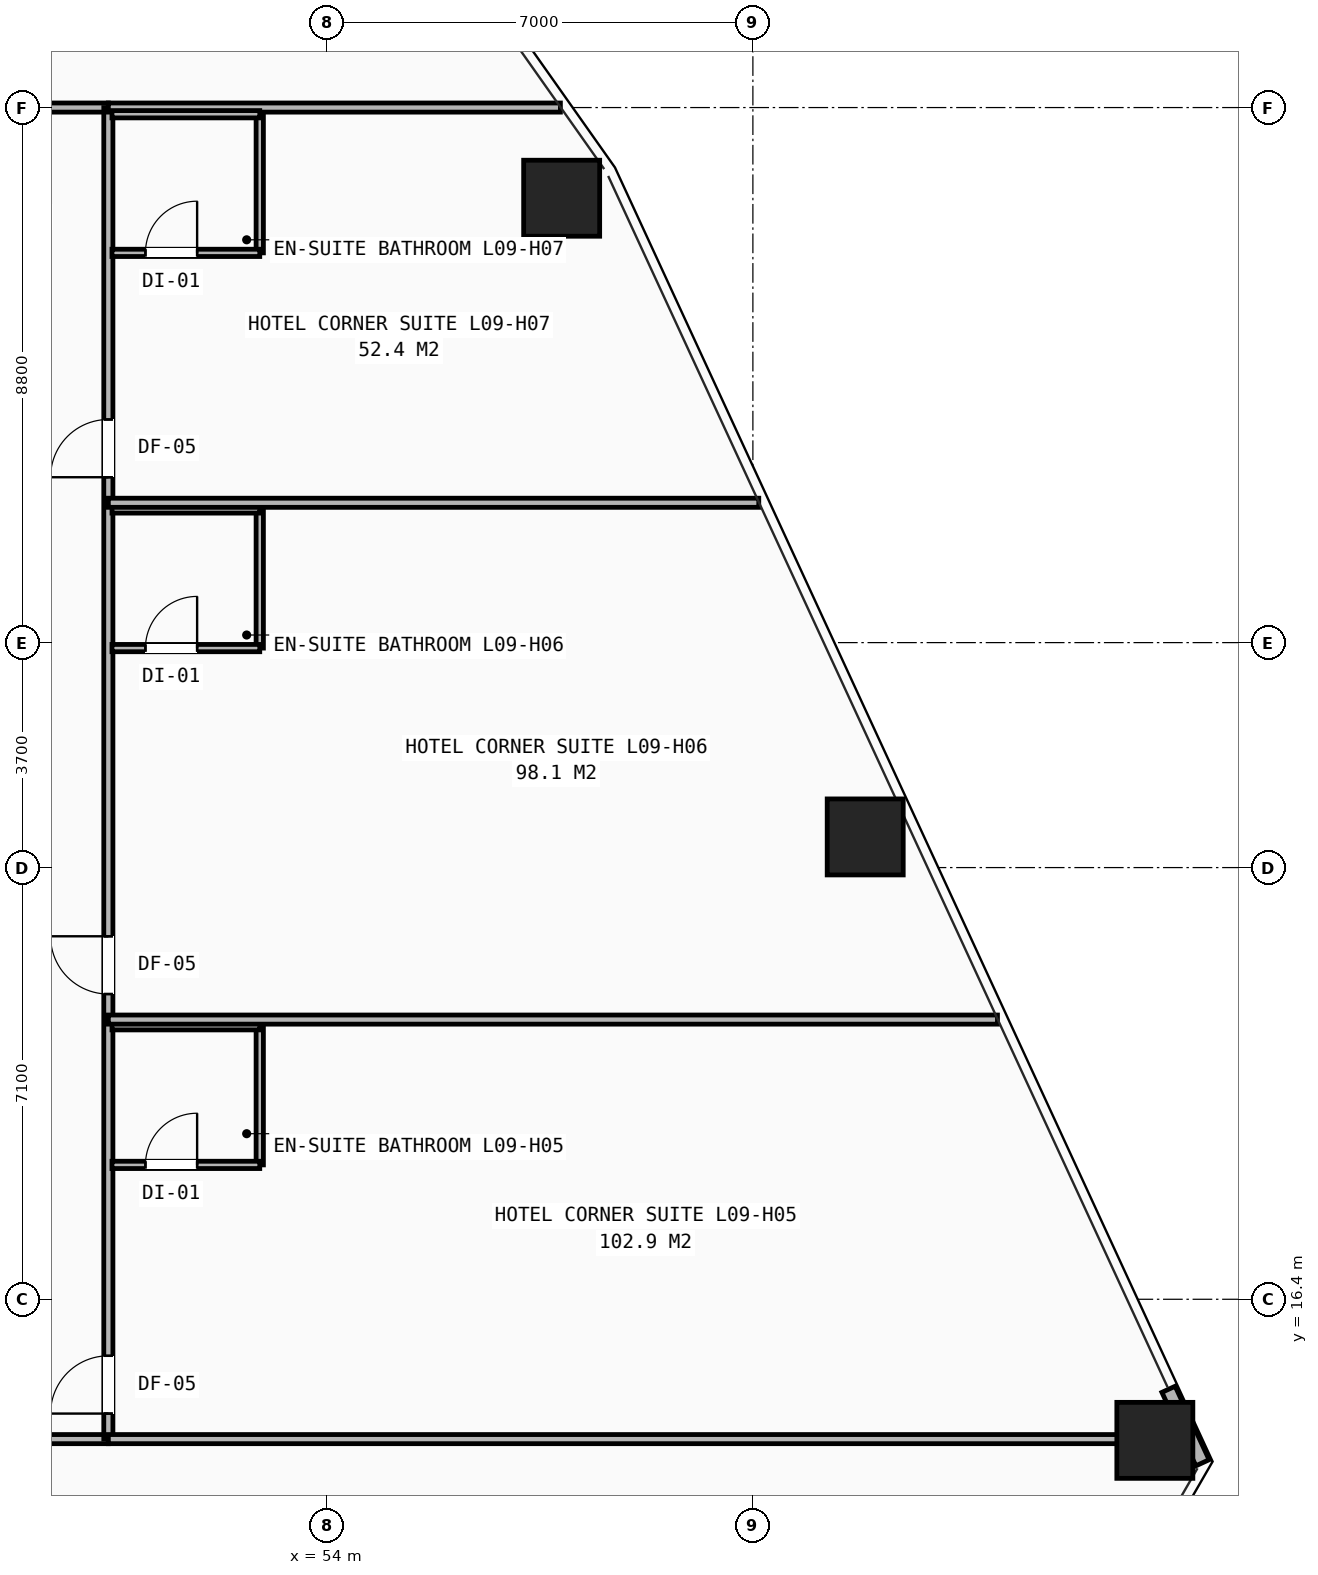
"""IFC4 building model, lengths in metres.
Left out: names, types, materials, properties, quantities, classifications, styles, units other than length and angle.
Written with IfcOpenShell. Run it as: python <this file> out.ifc"""

import sys

from ifc_helpers import new_model, si_unit, direction, frame, frame_2d, origin, origin_2d, place, context, subcontext, project, spatial, rectangle, hollow_rectangle, extrude, element, fill, save


model = new_model("IFC4")
c1 = context("Model", 3, precision=1e-05, world=origin(), true_north=direction((0.0, 1.0)))
c2 = subcontext(c1, "Body", "Model", "MODEL_VIEW")
j1 = project(units=[si_unit("LENGTHUNIT", "METRE"), si_unit("PLANEANGLEUNIT", "RADIAN")], contexts=[c1])
p1 = place(None, origin())
s1 = spatial("IfcSite", under=j1, at=p1, CompositionType="ELEMENT")
p2 = place(p1, origin())
s2 = spatial("IfcBuilding", under=s1, at=p2, CompositionType="ELEMENT")
p3 = place(p2, frame((0.0, 0.0, 36.8)))
s3 = spatial("IfcBuildingStorey", under=s2, at=p3, CompositionType="ELEMENT", Elevation=36.8)
for number, where, z_axis, x_axis in (
    (1, (67.611, 14.08, 0.0), (0.0, 0.0, 1.0), (1.0, 0.0, 0.0)),
    (2, (62.847, 24.004, 0.0), (0.0, 0.0, 1.0), (1.0, 0.0, 0.0)),
    (3, (57.855, 34.509, 0.0), (0.0, 0.0, 1.0), (1.0, 0.0, 0.0)),
):
    element("IfcColumn", number, at=place(p3, frame(where, z_axis=z_axis, x_axis=x_axis)), inside=s3, PredefinedType="COLUMN", context=c2, shape_type="SweptSolid", body=[
        extrude(hollow_rectangle(XDim=1.25, YDim=1.25, WallThickness=0.08, at=origin_2d()), origin(), (0.0, 0.0, 1.0), 3.2),
    ])
p4 = place(p3, frame((68.394, 13.711, 0.0), z_axis=(0.0, 0.0, 1.0), x_axis=(-0.419348851808, 0.907825170662, 0.0)))
e4 = element("IfcWall", 4, at=p4, inside=s3, PredefinedType="SHEAR", context=c2, shape_type="SweptSolid", body=[
    extrude(rectangle(XDim=1.332, YDim=0.24, at=frame_2d((0.666, 0.0))), origin(), (0.0, 0.0, 1.0), 2.263),
])
p5 = place(p3, frame((29.6, 14.1, 0.0), z_axis=(0.0, 0.0, 1.0), x_axis=(1.0, 0.0, 0.0)))
e5 = element("IfcWall", 5, at=p5, inside=s3, PredefinedType="PARTITIONING", context=c2, shape_type="SweptSolid", body=[
    extrude(rectangle(XDim=20.8, YDim=0.15, at=frame_2d((10.4, 0.0))), origin(), (0.0, 0.0, 1.0), 2.431),
])
p6 = place(p5, frame((0.57, 0.0, 0.0)))
e6 = element("IfcOpeningElement", 6, at=p6, cuts=e5, PredefinedType="OPENING", context=c2, shape_type="SweptSolid", body=[
    extrude(rectangle(XDim=0.95, YDim=2.1, at=frame_2d((0.475, 1.05))), frame((0.0, 0.085, 0.0), z_axis=(0.0, -1.0, 0.0), x_axis=(1.0, 0.0, 0.0)), (0.0, 0.0, 1.0), 0.17),
])
p7 = place(p5, frame((10.32, 0.0, 0.0)))
e7 = element("IfcOpeningElement", 7, at=p7, cuts=e5, PredefinedType="OPENING", context=c2, shape_type="SweptSolid", body=[
    extrude(rectangle(XDim=0.95, YDim=2.1, at=frame_2d((0.475, 1.05))), frame((0.0, 0.085, 0.0), z_axis=(0.0, -1.0, 0.0), x_axis=(1.0, 0.0, 0.0)), (0.0, 0.0, 1.0), 0.17),
])
p8 = place(p3, frame((40.75, 36.0, 0.0), z_axis=(0.0, 0.0, 1.0), x_axis=(1.0, 0.0, 0.0)))
e8 = element("IfcWall", 8, at=p8, inside=s3, PredefinedType="PARTITIONING", context=c2, shape_type="SweptSolid", body=[
    extrude(rectangle(XDim=9.65, YDim=0.15, at=frame_2d((4.825, 0.0))), origin(), (0.0, 0.0, 1.0), 2.513),
])
p9 = place(p8, frame((0.2, 0.0, 0.0)))
e9 = element("IfcOpeningElement", 9, at=p9, cuts=e8, PredefinedType="OPENING", context=c2, shape_type="SweptSolid", body=[
    extrude(rectangle(XDim=0.95, YDim=2.1, at=frame_2d((0.475, 1.05))), frame((0.0, 0.085, 0.0), z_axis=(0.0, -1.0, 0.0), x_axis=(1.0, 0.0, 0.0)), (0.0, 0.0, 1.0), 0.17),
])
p10 = place(p3, frame((50.4, 14.1, 0.0), z_axis=(0.0, 0.0, 1.0), x_axis=(0.0, 1.0, 0.0)))
e10 = element("IfcWall", 10, at=p10, inside=s3, PredefinedType="PARTITIONING", context=c2, shape_type="SweptSolid", body=[
    extrude(rectangle(XDim=21.9, YDim=0.15, at=frame_2d((10.95, 0.0))), origin(), (0.0, 0.0, 1.0), 2.431),
])
p11 = place(p10, frame((0.42, 0.0, 0.0)))
e11 = element("IfcOpeningElement", 11, at=p11, cuts=e10, PredefinedType="OPENING", context=c2, shape_type="SweptSolid", body=[
    extrude(rectangle(XDim=0.95, YDim=2.1, at=frame_2d((0.475, 1.05))), frame((0.0, 0.085, 0.0), z_axis=(0.0, -1.0, 0.0), x_axis=(1.0, 0.0, 0.0)), (0.0, 0.0, 1.0), 0.17),
])
p12 = place(p10, frame((7.32, 0.0, 0.0)))
e12 = element("IfcOpeningElement", 12, at=p12, cuts=e10, PredefinedType="OPENING", context=c2, shape_type="SweptSolid", body=[
    extrude(rectangle(XDim=0.95, YDim=2.1, at=frame_2d((0.475, 1.05))), frame((0.0, 0.085, 0.0), z_axis=(0.0, -1.0, 0.0), x_axis=(1.0, 0.0, 0.0)), (0.0, 0.0, 1.0), 0.17),
])
p13 = place(p10, frame((15.82, 0.0, 0.0)))
e13 = element("IfcOpeningElement", 13, at=p13, cuts=e10, PredefinedType="OPENING", context=c2, shape_type="SweptSolid", body=[
    extrude(rectangle(XDim=0.95, YDim=2.1, at=frame_2d((0.475, 1.05))), frame((0.0, 0.085, 0.0), z_axis=(0.0, -1.0, 0.0), x_axis=(1.0, 0.0, 0.0)), (0.0, 0.0, 1.0), 0.17),
])
p14 = place(p3, frame((50.4, 14.1, 0.0), z_axis=(0.0, 0.0, 1.0), x_axis=(1.0, 0.0, 0.0)))
e14 = element("IfcWall", 14, at=p14, inside=s3, PredefinedType="PARTITIONING", context=c2, shape_type="SweptSolid", body=[
    extrude(rectangle(XDim=17.809, YDim=0.15, at=frame_2d((8.904, 0.0))), origin(), (0.0, 0.0, 1.0), 2.268),
])
p15 = place(p3, frame((50.4, 36.0, 0.0), z_axis=(0.0, 0.0, 1.0), x_axis=(1.0, 0.0, 0.0)))
e15 = element("IfcWall", 15, at=p15, inside=s3, PredefinedType="PARTITIONING", context=c2, shape_type="SweptSolid", body=[
    extrude(rectangle(XDim=7.434, YDim=0.15, at=frame_2d((3.717, 0.0))), origin(), (0.0, 0.0, 1.0), 2.268),
])
p16 = place(p3, frame((52.89, 18.61, 0.0), z_axis=(0.0, 0.0, 1.0), x_axis=(0.0, 1.0, 0.0)))
e16 = element("IfcWall", 16, at=p16, inside=s3, PredefinedType="PARTITIONING", context=c2, shape_type="SweptSolid", body=[
    extrude(rectangle(XDim=2.28, YDim=0.12, at=frame_2d((1.14, 0.0))), origin(), (0.0, 0.0, 1.0), 2.98),
])
p17 = place(p3, frame((50.46, 18.61, 0.0), z_axis=(0.0, 0.0, 1.0), x_axis=(1.0, 0.0, 0.0)))
e17 = element("IfcWall", 17, at=p17, inside=s3, PredefinedType="PARTITIONING", context=c2, shape_type="SweptSolid", body=[
    extrude(rectangle(XDim=2.43, YDim=0.12, at=frame_2d((1.215, 0.0))), origin(), (0.0, 0.0, 1.0), 2.98),
])
p18 = place(p17, frame((0.55, 0.0, 0.0)))
e18 = element("IfcOpeningElement", 18, at=p18, cuts=e17, PredefinedType="OPENING", context=c2, shape_type="SweptSolid", body=[
    extrude(rectangle(XDim=0.85, YDim=2.05, at=frame_2d((0.425, 1.025))), frame((0.0, 0.07, 0.0), z_axis=(0.0, -1.0, 0.0), x_axis=(1.0, 0.0, 0.0)), (0.0, 0.0, 1.0), 0.14),
])
p19 = place(p3, frame((50.46, 20.89, 0.0), z_axis=(0.0, 0.0, 1.0), x_axis=(1.0, 0.0, 0.0)))
e19 = element("IfcWall", 19, at=p19, inside=s3, PredefinedType="PARTITIONING", context=c2, shape_type="SweptSolid", body=[
    extrude(rectangle(XDim=2.43, YDim=0.12, at=frame_2d((1.215, 0.0))), origin(), (0.0, 0.0, 1.0), 2.98),
])
p20 = place(p3, frame((50.4, 21.0, 0.0), z_axis=(0.0, 0.0, 1.0), x_axis=(1.0, 0.0, 0.0)))
e20 = element("IfcWall", 20, at=p20, inside=s3, PredefinedType="PARTITIONING", context=c2, shape_type="SweptSolid", body=[
    extrude(rectangle(XDim=14.622, YDim=0.15, at=frame_2d((7.311, 0.0))), origin(), (0.0, 0.0, 1.0), 2.268),
])
p21 = place(p3, frame((52.89, 27.11, 0.0), z_axis=(0.0, 0.0, 1.0), x_axis=(0.0, 1.0, 0.0)))
e21 = element("IfcWall", 21, at=p21, inside=s3, PredefinedType="PARTITIONING", context=c2, shape_type="SweptSolid", body=[
    extrude(rectangle(XDim=2.28, YDim=0.12, at=frame_2d((1.14, 0.0))), origin(), (0.0, 0.0, 1.0), 2.98),
])
p22 = place(p3, frame((50.46, 27.11, 0.0), z_axis=(0.0, 0.0, 1.0), x_axis=(1.0, 0.0, 0.0)))
e22 = element("IfcWall", 22, at=p22, inside=s3, PredefinedType="PARTITIONING", context=c2, shape_type="SweptSolid", body=[
    extrude(rectangle(XDim=2.43, YDim=0.12, at=frame_2d((1.215, 0.0))), origin(), (0.0, 0.0, 1.0), 2.98),
])
p23 = place(p22, frame((0.55, 0.0, 0.0)))
e23 = element("IfcOpeningElement", 23, at=p23, cuts=e22, PredefinedType="OPENING", context=c2, shape_type="SweptSolid", body=[
    extrude(rectangle(XDim=0.85, YDim=2.05, at=frame_2d((0.425, 1.025))), frame((0.0, 0.07, 0.0), z_axis=(0.0, -1.0, 0.0), x_axis=(1.0, 0.0, 0.0)), (0.0, 0.0, 1.0), 0.14),
])
p24 = place(p3, frame((50.46, 29.39, 0.0), z_axis=(0.0, 0.0, 1.0), x_axis=(1.0, 0.0, 0.0)))
e24 = element("IfcWall", 24, at=p24, inside=s3, PredefinedType="PARTITIONING", context=c2, shape_type="SweptSolid", body=[
    extrude(rectangle(XDim=2.43, YDim=0.12, at=frame_2d((1.215, 0.0))), origin(), (0.0, 0.0, 1.0), 2.98),
])
p25 = place(p3, frame((50.4, 29.5, 0.0), z_axis=(0.0, 0.0, 1.0), x_axis=(1.0, 0.0, 0.0)))
e25 = element("IfcWall", 25, at=p25, inside=s3, PredefinedType="PARTITIONING", context=c2, shape_type="SweptSolid", body=[
    extrude(rectangle(XDim=10.697, YDim=0.15, at=frame_2d((5.348, 0.0))), origin(), (0.0, 0.0, 1.0), 2.268),
])
p26 = place(p3, frame((52.89, 33.61, 0.0), z_axis=(0.0, 0.0, 1.0), x_axis=(0.0, 1.0, 0.0)))
e26 = element("IfcWall", 26, at=p26, inside=s3, PredefinedType="PARTITIONING", context=c2, shape_type="SweptSolid", body=[
    extrude(rectangle(XDim=2.28, YDim=0.12, at=frame_2d((1.14, 0.0))), origin(), (0.0, 0.0, 1.0), 2.98),
])
p27 = place(p3, frame((50.46, 33.61, 0.0), z_axis=(0.0, 0.0, 1.0), x_axis=(1.0, 0.0, 0.0)))
e27 = element("IfcWall", 27, at=p27, inside=s3, PredefinedType="PARTITIONING", context=c2, shape_type="SweptSolid", body=[
    extrude(rectangle(XDim=2.43, YDim=0.12, at=frame_2d((1.215, 0.0))), origin(), (0.0, 0.0, 1.0), 2.513),
])
p28 = place(p27, frame((0.55, 0.0, 0.0)))
e28 = element("IfcOpeningElement", 28, at=p28, cuts=e27, PredefinedType="OPENING", context=c2, shape_type="SweptSolid", body=[
    extrude(rectangle(XDim=0.85, YDim=2.05, at=frame_2d((0.425, 1.025))), frame((0.0, 0.07, 0.0), z_axis=(0.0, -1.0, 0.0), x_axis=(1.0, 0.0, 0.0)), (0.0, 0.0, 1.0), 0.14),
])
p29 = place(p3, frame((50.46, 35.89, 0.0), z_axis=(0.0, 0.0, 1.0), x_axis=(1.0, 0.0, 0.0)))
e29 = element("IfcWall", 29, at=p29, inside=s3, PredefinedType="PARTITIONING", context=c2, shape_type="SweptSolid", body=[
    extrude(rectangle(XDim=2.43, YDim=0.12, at=frame_2d((1.215, 0.0))), origin(), (0.0, 0.0, 1.0), 2.513),
])
p30 = place(p11, origin())
e30 = element("IfcDoor", 30, at=p30, inside=s3, OperationType="SINGLE_SWING_LEFT", PredefinedType="DOOR", context=c2, shape_type="SweptSolid", body=[
    extrude(rectangle(XDim=0.95, YDim=2.1, at=frame_2d((0.475, 1.05))), frame((0.0, 0.025, 0.0), z_axis=(0.0, -1.0, 0.0), x_axis=(1.0, 0.0, 0.0)), (0.0, 0.0, 1.0), 0.05),
])
fill(e11, e30)
p31 = place(p18, origin())
e31 = element("IfcDoor", 31, at=p31, inside=s3, OperationType="SINGLE_SWING_RIGHT", PredefinedType="DOOR", context=c2, shape_type="SweptSolid", body=[
    extrude(rectangle(XDim=0.85, YDim=2.05, at=frame_2d((0.425, 1.025))), frame((0.0, 0.025, 0.0), z_axis=(0.0, -1.0, 0.0), x_axis=(1.0, 0.0, 0.0)), (0.0, 0.0, 1.0), 0.05),
])
fill(e18, e31)
p32 = place(p12, origin())
e32 = element("IfcDoor", 32, at=p32, inside=s3, OperationType="SINGLE_SWING_RIGHT", PredefinedType="DOOR", context=c2, shape_type="SweptSolid", body=[
    extrude(rectangle(XDim=0.95, YDim=2.1, at=frame_2d((0.475, 1.05))), frame((0.0, 0.025, 0.0), z_axis=(0.0, -1.0, 0.0), x_axis=(1.0, 0.0, 0.0)), (0.0, 0.0, 1.0), 0.05),
])
fill(e12, e32)
p33 = place(p23, origin())
e33 = element("IfcDoor", 33, at=p33, inside=s3, OperationType="SINGLE_SWING_RIGHT", PredefinedType="DOOR", context=c2, shape_type="SweptSolid", body=[
    extrude(rectangle(XDim=0.85, YDim=2.05, at=frame_2d((0.425, 1.025))), frame((0.0, 0.025, 0.0), z_axis=(0.0, -1.0, 0.0), x_axis=(1.0, 0.0, 0.0)), (0.0, 0.0, 1.0), 0.05),
])
fill(e23, e33)
p34 = place(p13, origin())
e34 = element("IfcDoor", 34, at=p34, inside=s3, OperationType="SINGLE_SWING_LEFT", PredefinedType="DOOR", context=c2, shape_type="SweptSolid", body=[
    extrude(rectangle(XDim=0.95, YDim=2.1, at=frame_2d((0.475, 1.05))), frame((0.0, 0.025, 0.0), z_axis=(0.0, -1.0, 0.0), x_axis=(1.0, 0.0, 0.0)), (0.0, 0.0, 1.0), 0.05),
])
fill(e13, e34)
p35 = place(p28, origin())
e35 = element("IfcDoor", 35, at=p35, inside=s3, OperationType="SINGLE_SWING_RIGHT", PredefinedType="DOOR", context=c2, shape_type="SweptSolid", body=[
    extrude(rectangle(XDim=0.85, YDim=2.05, at=frame_2d((0.425, 1.025))), frame((0.0, 0.025, 0.0), z_axis=(0.0, -1.0, 0.0), x_axis=(1.0, 0.0, 0.0)), (0.0, 0.0, 1.0), 0.05),
])
fill(e28, e35)
save(model, sys.argv[1])
